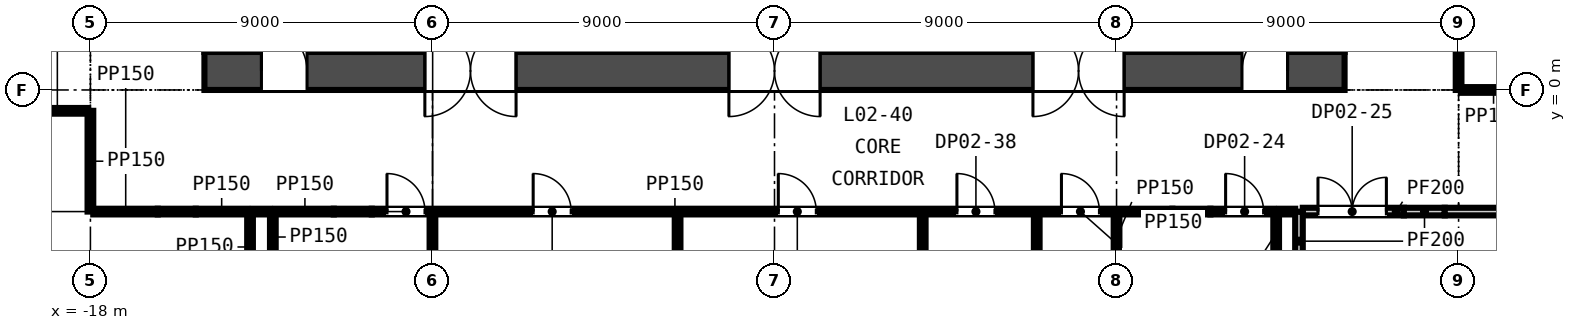
"""IFC4 building model, lengths in metres.
Left out: names, types, materials, properties, quantities, classifications, styles, units other than length and angle.
Written with IfcOpenShell. Run it as: python <this file> out.ifc"""

import sys

from ifc_helpers import new_model, si_unit, direction, frame, frame_2d, origin, place, context, subcontext, project, spatial, rectangle, extrude, element, fill, save


model = new_model("IFC4")
c1 = context("Model", 3, precision=1e-05, world=origin(), true_north=direction((0.0, 1.0)))
c2 = subcontext(c1, "Body", "Model", "MODEL_VIEW")
j1 = project(units=[si_unit("LENGTHUNIT", "METRE"), si_unit("PLANEANGLEUNIT", "RADIAN")], contexts=[c1])
p1 = place(None, origin())
s1 = spatial("IfcSite", under=j1, at=p1, CompositionType="ELEMENT")
p2 = place(p1, origin())
s2 = spatial("IfcBuilding", under=s1, at=p2, CompositionType="ELEMENT")
p3 = place(p2, frame((0.0, 0.0, 18.0)))
s3 = spatial("IfcBuildingStorey", under=s2, at=p3, CompositionType="ELEMENT", Elevation=18.0)
p4 = place(p3, frame((-15.0, 0.5, -0.4), z_axis=(0.0, 0.0, 1.0), x_axis=(1.0, 0.0, 0.0)))
e1 = element("IfcWall", 1, at=p4, inside=s3, PredefinedType="SOLIDWALL", context=c2, shape_type="SweptSolid", body=[
    extrude(rectangle(XDim=30.0, YDim=1.0, at=frame_2d((15.0, 0.0))), origin(), (0.0, 0.0, 1.0), 4.6),
])
p5 = place(p4, frame((5.8, 0.0, 0.4)))
e2 = element("IfcOpeningElement", 2, at=p5, cuts=e1, PredefinedType="OPENING", context=c2, shape_type="SweptSolid", body=[
    extrude(rectangle(XDim=2.4, YDim=2.4, at=frame_2d((1.2, 1.2))), frame((0.0, 0.51, 0.0), z_axis=(0.0, -1.0, 0.0), x_axis=(1.0, 0.0, 0.0)), (0.0, 0.0, 1.0), 1.02),
])
p6 = place(p4, frame((13.8, 0.0, 0.4)))
e3 = element("IfcOpeningElement", 3, at=p6, cuts=e1, PredefinedType="OPENING", context=c2, shape_type="SweptSolid", body=[
    extrude(rectangle(XDim=2.4, YDim=2.4, at=frame_2d((1.2, 1.2))), frame((0.0, 0.51, 0.0), z_axis=(0.0, -1.0, 0.0), x_axis=(1.0, 0.0, 0.0)), (0.0, 0.0, 1.0), 1.02),
])
p7 = place(p4, frame((21.8, 0.0, 0.4)))
e4 = element("IfcOpeningElement", 4, at=p7, cuts=e1, PredefinedType="OPENING", context=c2, shape_type="SweptSolid", body=[
    extrude(rectangle(XDim=2.4, YDim=2.4, at=frame_2d((1.2, 1.2))), frame((0.0, 0.51, 0.0), z_axis=(0.0, -1.0, 0.0), x_axis=(1.0, 0.0, 0.0)), (0.0, 0.0, 1.0), 1.02),
])
p8 = place(p4, frame((1.5, 0.0, 0.4)))
e5 = element("IfcOpeningElement", 5, at=p8, cuts=e1, PredefinedType="OPENING", context=c2, shape_type="SweptSolid", body=[
    extrude(rectangle(XDim=1.2, YDim=2.1, at=frame_2d((0.6, 1.05))), frame((0.0, 0.51, 0.0), z_axis=(0.0, -1.0, 0.0), x_axis=(1.0, 0.0, 0.0)), (0.0, 0.0, 1.0), 1.02),
])
p9 = place(p4, frame((27.3, 0.0, 0.4)))
e6 = element("IfcOpeningElement", 6, at=p9, cuts=e1, PredefinedType="OPENING", context=c2, shape_type="SweptSolid", body=[
    extrude(rectangle(XDim=1.2, YDim=2.1, at=frame_2d((0.6, 1.05))), frame((0.0, 0.51, 0.0), z_axis=(0.0, -1.0, 0.0), x_axis=(1.0, 0.0, 0.0)), (0.0, 0.0, 1.0), 1.02),
])
p10 = place(p3, frame((-17.925, -3.2, 0.0), z_axis=(0.0, 0.0, 1.0), x_axis=(1.0, 0.0, 0.0)))
e7 = element("IfcWall", 7, at=p10, inside=s3, PredefinedType="PARTITIONING", context=c2, shape_type="SweptSolid", body=[
    extrude(rectangle(XDim=1.697, YDim=0.15, at=frame_2d((0.849, 0.0))), origin(), (0.0, 0.0, 1.0), 4.2),
])
p11 = place(p3, frame((-16.228, -3.2, 0.0), z_axis=(0.0, 0.0, 1.0), x_axis=(1.0, 0.0, 0.0)))
e8 = element("IfcWall", 8, at=p11, inside=s3, PredefinedType="PARTITIONING", context=c2, shape_type="SweptSolid", body=[
    extrude(rectangle(XDim=1.0, YDim=0.15, at=frame_2d((0.5, 0.0))), origin(), (0.0, 0.0, 1.0), 3.365),
])
p12 = place(p3, frame((-15.228, -3.2, 0.0), z_axis=(0.0, 0.0, 1.0), x_axis=(1.0, 0.0, 0.0)))
e9 = element("IfcWall", 9, at=p12, inside=s3, PredefinedType="PARTITIONING", context=c2, shape_type="SweptSolid", body=[
    extrude(rectangle(XDim=1.353, YDim=0.15, at=frame_2d((0.676, 0.0))), origin(), (0.0, 0.0, 1.0), 4.2),
])
p13 = place(p3, frame((-13.725, -3.2, 0.0), z_axis=(0.0, 0.0, 1.0), x_axis=(1.0, 0.0, 0.0)))
e10 = element("IfcWall", 10, at=p13, inside=s3, PredefinedType="PARTITIONING", context=c2, shape_type="SweptSolid", body=[
    extrude(rectangle(XDim=0.45, YDim=0.15, at=frame_2d((0.225, 0.0))), origin(), (0.0, 0.0, 1.0), 4.2),
])
p14 = place(p3, frame((-13.125, -3.2, 0.0), z_axis=(0.0, 0.0, 1.0), x_axis=(1.0, 0.0, 0.0)))
e11 = element("IfcWall", 11, at=p14, inside=s3, PredefinedType="PARTITIONING", context=c2, shape_type="SweptSolid", body=[
    extrude(rectangle(XDim=1.529, YDim=0.15, at=frame_2d((0.764, 0.0))), origin(), (0.0, 0.0, 1.0), 4.2),
])
p15 = place(p3, frame((-11.596, -3.2, 0.0), z_axis=(0.0, 0.0, 1.0), x_axis=(1.0, 0.0, 0.0)))
e12 = element("IfcWall", 12, at=p15, inside=s3, PredefinedType="PARTITIONING", context=c2, shape_type="SweptSolid", body=[
    extrude(rectangle(XDim=1.0, YDim=0.15, at=frame_2d((0.5, 0.0))), origin(), (0.0, 0.0, 1.0), 3.298),
])
p16 = place(p3, frame((-10.596, -3.2, 0.0), z_axis=(0.0, 0.0, 1.0), x_axis=(1.0, 0.0, 0.0)))
e13 = element("IfcWall", 13, at=p16, inside=s3, PredefinedType="PARTITIONING", context=c2, shape_type="SweptSolid", body=[
    extrude(rectangle(XDim=21.066, YDim=0.15, at=frame_2d((10.533, 0.0))), origin(), (0.0, 0.0, 1.0), 4.2),
])
p17 = place(p16, frame((0.4, 0.0, 0.0)))
e14 = element("IfcOpeningElement", 14, at=p17, cuts=e13, PredefinedType="OPENING", context=c2, shape_type="SweptSolid", body=[
    extrude(rectangle(XDim=1.0, YDim=2.1, at=frame_2d((0.5, 1.05))), frame((0.0, 0.085, 0.0), z_axis=(0.0, -1.0, 0.0), x_axis=(1.0, 0.0, 0.0)), (0.0, 0.0, 1.0), 0.17),
])
p18 = place(p16, frame((4.246, 0.0, 0.0)))
e15 = element("IfcOpeningElement", 15, at=p18, cuts=e13, PredefinedType="OPENING", context=c2, shape_type="SweptSolid", body=[
    extrude(rectangle(XDim=1.0, YDim=2.1, at=frame_2d((0.5, 1.05))), frame((0.0, 0.085, 0.0), z_axis=(0.0, -1.0, 0.0), x_axis=(1.0, 0.0, 0.0)), (0.0, 0.0, 1.0), 0.17),
])
p19 = place(p16, frame((10.696, 0.0, 0.0)))
e16 = element("IfcOpeningElement", 16, at=p19, cuts=e13, PredefinedType="OPENING", context=c2, shape_type="SweptSolid", body=[
    extrude(rectangle(XDim=1.0, YDim=2.1, at=frame_2d((0.5, 1.05))), frame((0.0, 0.085, 0.0), z_axis=(0.0, -1.0, 0.0), x_axis=(1.0, 0.0, 0.0)), (0.0, 0.0, 1.0), 0.17),
])
p20 = place(p16, frame((15.396, 0.0, 0.0)))
e17 = element("IfcOpeningElement", 17, at=p20, cuts=e13, PredefinedType="OPENING", context=c2, shape_type="SweptSolid", body=[
    extrude(rectangle(XDim=1.0, YDim=2.1, at=frame_2d((0.5, 1.05))), frame((0.0, 0.085, 0.0), z_axis=(0.0, -1.0, 0.0), x_axis=(1.0, 0.0, 0.0)), (0.0, 0.0, 1.0), 0.17),
])
p21 = place(p16, frame((18.146, 0.0, 0.0)))
e18 = element("IfcOpeningElement", 18, at=p21, cuts=e13, PredefinedType="OPENING", context=c2, shape_type="SweptSolid", body=[
    extrude(rectangle(XDim=1.0, YDim=2.1, at=frame_2d((0.5, 1.05))), frame((0.0, 0.085, 0.0), z_axis=(0.0, -1.0, 0.0), x_axis=(1.0, 0.0, 0.0)), (0.0, 0.0, 1.0), 0.17),
])
p22 = place(p3, frame((10.47, -3.2, 0.0), z_axis=(0.0, 0.0, 1.0), x_axis=(1.0, 0.0, 0.0)))
e19 = element("IfcWall", 19, at=p22, inside=s3, PredefinedType="PARTITIONING", context=c2, shape_type="SweptSolid", body=[
    extrude(rectangle(XDim=1.0, YDim=0.15, at=frame_2d((0.5, 0.0))), origin(), (0.0, 0.0, 1.0), 3.298),
])
p23 = place(p3, frame((11.47, -3.2, 0.0), z_axis=(0.0, 0.0, 1.0), x_axis=(1.0, 0.0, 0.0)))
e20 = element("IfcWall", 20, at=p23, inside=s3, PredefinedType="PARTITIONING", context=c2, shape_type="SweptSolid", body=[
    extrude(rectangle(XDim=1.655, YDim=0.15, at=frame_2d((0.828, 0.0))), origin(), (0.0, 0.0, 1.0), 4.2),
])
p24 = place(p23, frame((0.4, 0.0, 0.0)))
e21 = element("IfcOpeningElement", 21, at=p24, cuts=e20, PredefinedType="OPENING", context=c2, shape_type="SweptSolid", body=[
    extrude(rectangle(XDim=1.0, YDim=2.1, at=frame_2d((0.5, 1.05))), frame((0.0, 0.085, 0.0), z_axis=(0.0, -1.0, 0.0), x_axis=(1.0, 0.0, 0.0)), (0.0, 0.0, 1.0), 0.17),
])
p25 = place(p3, frame((13.275, -3.2, 0.0), z_axis=(0.0, 0.0, 1.0), x_axis=(1.0, 0.0, 0.0)))
e22 = element("IfcWall", 22, at=p25, inside=s3, PredefinedType="PARTITIONING", context=c2, shape_type="SweptSolid", body=[
    extrude(rectangle(XDim=0.425, YDim=0.15, at=frame_2d((0.212, 0.0))), origin(), (0.0, 0.0, 1.0), 4.2),
])
p26 = place(p3, frame((13.9, -3.2, 0.0), z_axis=(0.0, 0.0, 1.0), x_axis=(1.0, 0.0, 0.0)))
e23 = element("IfcWall", 23, at=p26, inside=s3, PredefinedType="PARTITIONING", context=c2, shape_type="SweptSolid", body=[
    extrude(rectangle(XDim=2.66, YDim=0.2, at=frame_2d((1.33, 0.0))), origin(), (0.0, 0.0, 1.0), 4.2),
])
p27 = place(p26, frame((0.4, 0.0, 0.0)))
e24 = element("IfcOpeningElement", 24, at=p27, cuts=e23, PredefinedType="OPENING", context=c2, shape_type="SweptSolid", body=[
    extrude(rectangle(XDim=1.8, YDim=2.4, at=frame_2d((0.9, 1.2))), frame((0.0, 0.11, 0.0), z_axis=(0.0, -1.0, 0.0), x_axis=(1.0, 0.0, 0.0)), (0.0, 0.0, 1.0), 0.22),
])
p28 = place(p3, frame((16.56, -3.2, 0.0), z_axis=(0.0, 0.0, 1.0), x_axis=(1.0, 0.0, 0.0)))
e25 = element("IfcWall", 25, at=p28, inside=s3, PredefinedType="PARTITIONING", context=c2, shape_type="SweptSolid", body=[
    extrude(rectangle(XDim=1.076, YDim=0.2, at=frame_2d((0.538, 0.0))), origin(), (0.0, 0.0, 1.0), 3.441),
])
p29 = place(p3, frame((17.636, -3.2, 0.0), z_axis=(0.0, 0.0, 1.0), x_axis=(1.0, 0.0, 0.0)))
e26 = element("IfcWall", 26, at=p29, inside=s3, PredefinedType="PARTITIONING", context=c2, shape_type="SweptSolid", body=[
    extrude(rectangle(XDim=4.464, YDim=0.2, at=frame_2d((2.232, 0.0))), origin(), (0.0, 0.0, 1.0), 4.2),
])
p30 = place(p3, frame((-22.125, -0.549, 0.0), z_axis=(0.0, 0.0, 1.0), x_axis=(1.0, 0.0, 0.0)))
e27 = element("IfcWall", 27, at=p30, inside=s3, PredefinedType="PARTITIONING", context=c2, shape_type="SweptSolid", body=[
    extrude(rectangle(XDim=4.05, YDim=0.15, at=frame_2d((2.025, 0.0))), origin(), (0.0, 0.0, 1.0), 4.2),
])
p31 = place(p30, frame((1.4, 0.0, 0.0)))
e28 = element("IfcOpeningElement", 28, at=p31, cuts=e27, PredefinedType="OPENING", context=c2, shape_type="SweptSolid", body=[
    extrude(rectangle(XDim=1.0, YDim=2.1, at=frame_2d((0.5, 1.05))), frame((0.0, 0.085, 0.0), z_axis=(0.0, -1.0, 0.0), x_axis=(1.0, 0.0, 0.0)), (0.0, 0.0, 1.0), 0.17),
])
p32 = place(p3, frame((18.075, 0.0, 0.0), z_axis=(0.0, 0.0, 1.0), x_axis=(1.0, 0.0, 0.0)))
e29 = element("IfcWall", 29, at=p32, inside=s3, PredefinedType="PARTITIONING", context=c2, shape_type="SweptSolid", body=[
    extrude(rectangle(XDim=1.68, YDim=0.15, at=frame_2d((0.84, 0.0))), origin(), (0.0, 0.0, 1.0), 3.597),
])
p33 = place(p3, frame((-18.0, -3.2, 0.0), z_axis=(0.0, 0.0, 1.0), x_axis=(0.0, 1.0, 0.0)))
e30 = element("IfcWall", 30, at=p33, inside=s3, PredefinedType="PARTITIONING", context=c2, shape_type="SweptSolid", body=[
    extrude(rectangle(XDim=2.651, YDim=0.15, at=frame_2d((1.326, 0.0))), origin(), (0.0, 0.0, 1.0), 4.2),
])
p34 = place(p3, frame((-13.8, -5.062, 0.0), z_axis=(0.0, 0.0, 1.0), x_axis=(0.0, 1.0, 0.0)))
e31 = element("IfcWall", 31, at=p34, inside=s3, PredefinedType="PARTITIONING", context=c2, shape_type="SweptSolid", body=[
    extrude(rectangle(XDim=1.861, YDim=0.15, at=frame_2d((0.931, 0.0))), origin(), (0.0, 0.0, 1.0), 4.2),
])
p35 = place(p3, frame((-13.2, -4.538, 0.0), z_axis=(0.0, 0.0, 1.0), x_axis=(0.0, 1.0, 0.0)))
e32 = element("IfcWall", 32, at=p35, inside=s3, PredefinedType="PARTITIONING", context=c2, shape_type="SweptSolid", body=[
    extrude(rectangle(XDim=1.337, YDim=0.15, at=frame_2d((0.668, 0.0))), origin(), (0.0, 0.0, 1.0), 4.2),
])
p36 = place(p3, frame((-9.0, -4.881, 0.0), z_axis=(0.0, 0.0, 1.0), x_axis=(0.0, 1.0, 0.0)))
e33 = element("IfcWall", 33, at=p36, inside=s3, PredefinedType="PARTITIONING", context=c2, shape_type="SweptSolid", body=[
    extrude(rectangle(XDim=1.606, YDim=0.15, at=frame_2d((0.803, 0.0))), origin(), (0.0, 0.0, 1.0), 3.6),
])
for number, where, z_axis, x_axis in (
    (34, (-2.55, -9.0, 0.0), (0.0, 0.0, 1.0), (0.0, 1.0, 0.0)),
    (35, (3.9, -9.0, 0.0), (0.0, 0.0, 1.0), (0.0, 1.0, 0.0)),
    (36, (6.9, -9.0, 0.0), (0.0, 0.0, 1.0), (0.0, 1.0, 0.0)),
):
    element("IfcWall", number, at=place(p3, frame(where, z_axis=z_axis, x_axis=x_axis)), inside=s3, PredefinedType="PARTITIONING", context=c2, shape_type="SweptSolid", body=[
        extrude(rectangle(XDim=5.725, YDim=0.15, at=frame_2d((2.863, 0.0))), origin(), (0.0, 0.0, 1.0), 4.2),
    ])
p37 = place(p3, frame((9.0, -4.487, 0.0), z_axis=(0.0, 0.0, 1.0), x_axis=(0.0, 1.0, 0.0)))
e37 = element("IfcWall", 37, at=p37, inside=s3, PredefinedType="PARTITIONING", context=c2, shape_type="SweptSolid", body=[
    extrude(rectangle(XDim=1.212, YDim=0.15, at=frame_2d((0.606, 0.0))), origin(), (0.0, 0.0, 1.0), 4.2),
])
p38 = place(p3, frame((13.2, -4.32, 0.0), z_axis=(0.0, 0.0, 1.0), x_axis=(0.0, 1.0, 0.0)))
e38 = element("IfcWall", 38, at=p38, inside=s3, PredefinedType="PARTITIONING", context=c2, shape_type="SweptSolid", body=[
    extrude(rectangle(XDim=1.119, YDim=0.15, at=frame_2d((0.56, 0.0))), origin(), (0.0, 0.0, 1.0), 4.2),
])
p39 = place(p3, frame((13.8, -4.756, 0.0), z_axis=(0.0, 0.0, 1.0), x_axis=(0.0, 1.0, 0.0)))
e39 = element("IfcWall", 39, at=p39, inside=s3, PredefinedType="PARTITIONING", context=c2, shape_type="SweptSolid", body=[
    extrude(rectangle(XDim=1.555, YDim=0.2, at=frame_2d((0.778, 0.0))), origin(), (0.0, 0.0, 1.0), 4.2),
])
p40 = place(p3, frame((18.0, 0.0, 0.0), z_axis=(0.0, 0.0, 1.0), x_axis=(0.0, 1.0, 0.0)))
e40 = element("IfcWall", 40, at=p40, inside=s3, PredefinedType="PARTITIONING", context=c2, shape_type="SweptSolid", body=[
    extrude(rectangle(XDim=14.25, YDim=0.15, at=frame_2d((7.125, 0.0))), origin(), (0.0, 0.0, 1.0), 4.2),
])
p41 = place(p5, origin())
e41 = element("IfcDoor", 41, at=p41, inside=s3, OperationType="DOUBLE_DOOR_DOUBLE_SWING", PredefinedType="DOOR", context=c2, shape_type="SweptSolid", body=[
    extrude(rectangle(XDim=2.4, YDim=2.4, at=frame_2d((1.2, 1.2))), frame((0.0, 0.025, 0.0), z_axis=(0.0, -1.0, 0.0), x_axis=(1.0, 0.0, 0.0)), (0.0, 0.0, 1.0), 0.05),
])
fill(e2, e41)
p42 = place(p6, origin())
e42 = element("IfcDoor", 42, at=p42, inside=s3, OperationType="DOUBLE_DOOR_DOUBLE_SWING", PredefinedType="DOOR", context=c2, shape_type="SweptSolid", body=[
    extrude(rectangle(XDim=2.4, YDim=2.4, at=frame_2d((1.2, 1.2))), frame((0.0, 0.025, 0.0), z_axis=(0.0, -1.0, 0.0), x_axis=(1.0, 0.0, 0.0)), (0.0, 0.0, 1.0), 0.05),
])
fill(e3, e42)
p43 = place(p7, origin())
e43 = element("IfcDoor", 43, at=p43, inside=s3, OperationType="DOUBLE_DOOR_DOUBLE_SWING", PredefinedType="DOOR", context=c2, shape_type="SweptSolid", body=[
    extrude(rectangle(XDim=2.4, YDim=2.4, at=frame_2d((1.2, 1.2))), frame((0.0, 0.025, 0.0), z_axis=(0.0, -1.0, 0.0), x_axis=(1.0, 0.0, 0.0)), (0.0, 0.0, 1.0), 0.05),
])
fill(e4, e43)
p44 = place(p8, origin())
e44 = element("IfcDoor", 44, at=p44, inside=s3, OperationType="SINGLE_SWING_LEFT", PredefinedType="DOOR", context=c2, shape_type="SweptSolid", body=[
    extrude(rectangle(XDim=1.2, YDim=2.1, at=frame_2d((0.6, 1.05))), frame((0.0, 0.025, 0.0), z_axis=(0.0, -1.0, 0.0), x_axis=(1.0, 0.0, 0.0)), (0.0, 0.0, 1.0), 0.05),
])
fill(e5, e44)
p45 = place(p9, origin())
e45 = element("IfcDoor", 45, at=p45, inside=s3, OperationType="SINGLE_SWING_RIGHT", PredefinedType="DOOR", context=c2, shape_type="SweptSolid", body=[
    extrude(rectangle(XDim=1.2, YDim=2.1, at=frame_2d((0.6, 1.05))), frame((0.0, 0.025, 0.0), z_axis=(0.0, -1.0, 0.0), x_axis=(1.0, 0.0, 0.0)), (0.0, 0.0, 1.0), 0.05),
])
fill(e6, e45)
p46 = place(p17, origin())
e46 = element("IfcDoor", 46, at=p46, inside=s3, OperationType="SINGLE_SWING_LEFT", PredefinedType="DOOR", context=c2, shape_type="SweptSolid", body=[
    extrude(rectangle(XDim=1.0, YDim=2.1, at=frame_2d((0.5, 1.05))), frame((0.0, 0.025, 0.0), z_axis=(0.0, -1.0, 0.0), x_axis=(1.0, 0.0, 0.0)), (0.0, 0.0, 1.0), 0.05),
])
fill(e14, e46)
p47 = place(p24, origin())
e47 = element("IfcDoor", 47, at=p47, inside=s3, OperationType="SINGLE_SWING_LEFT", PredefinedType="DOOR", context=c2, shape_type="SweptSolid", body=[
    extrude(rectangle(XDim=1.0, YDim=2.1, at=frame_2d((0.5, 1.05))), frame((0.0, 0.025, 0.0), z_axis=(0.0, -1.0, 0.0), x_axis=(1.0, 0.0, 0.0)), (0.0, 0.0, 1.0), 0.05),
])
fill(e21, e47)
p48 = place(p27, origin())
e48 = element("IfcDoor", 48, at=p48, inside=s3, OperationType="SINGLE_SWING_LEFT", PredefinedType="DOOR", context=c2, shape_type="SweptSolid", body=[
    extrude(rectangle(XDim=1.8, YDim=2.4, at=frame_2d((0.9, 1.2))), frame((0.0, 0.025, 0.0), z_axis=(0.0, -1.0, 0.0), x_axis=(1.0, 0.0, 0.0)), (0.0, 0.0, 1.0), 0.05),
])
fill(e24, e48)
p49 = place(p18, origin())
e49 = element("IfcDoor", 49, at=p49, inside=s3, OperationType="SINGLE_SWING_LEFT", PredefinedType="DOOR", context=c2, shape_type="SweptSolid", body=[
    extrude(rectangle(XDim=1.0, YDim=2.1, at=frame_2d((0.5, 1.05))), frame((0.0, 0.025, 0.0), z_axis=(0.0, -1.0, 0.0), x_axis=(1.0, 0.0, 0.0)), (0.0, 0.0, 1.0), 0.05),
])
fill(e15, e49)
p50 = place(p19, origin())
e50 = element("IfcDoor", 50, at=p50, inside=s3, OperationType="SINGLE_SWING_LEFT", PredefinedType="DOOR", context=c2, shape_type="SweptSolid", body=[
    extrude(rectangle(XDim=1.0, YDim=2.1, at=frame_2d((0.5, 1.05))), frame((0.0, 0.025, 0.0), z_axis=(0.0, -1.0, 0.0), x_axis=(1.0, 0.0, 0.0)), (0.0, 0.0, 1.0), 0.05),
])
fill(e16, e50)
p51 = place(p20, origin())
e51 = element("IfcDoor", 51, at=p51, inside=s3, OperationType="SINGLE_SWING_LEFT", PredefinedType="DOOR", context=c2, shape_type="SweptSolid", body=[
    extrude(rectangle(XDim=1.0, YDim=2.1, at=frame_2d((0.5, 1.05))), frame((0.0, 0.025, 0.0), z_axis=(0.0, -1.0, 0.0), x_axis=(1.0, 0.0, 0.0)), (0.0, 0.0, 1.0), 0.05),
])
fill(e17, e51)
p52 = place(p21, origin())
e52 = element("IfcDoor", 52, at=p52, inside=s3, OperationType="SINGLE_SWING_LEFT", PredefinedType="DOOR", context=c2, shape_type="SweptSolid", body=[
    extrude(rectangle(XDim=1.0, YDim=2.1, at=frame_2d((0.5, 1.05))), frame((0.0, 0.025, 0.0), z_axis=(0.0, -1.0, 0.0), x_axis=(1.0, 0.0, 0.0)), (0.0, 0.0, 1.0), 0.05),
])
fill(e18, e52)
save(model, sys.argv[1])
